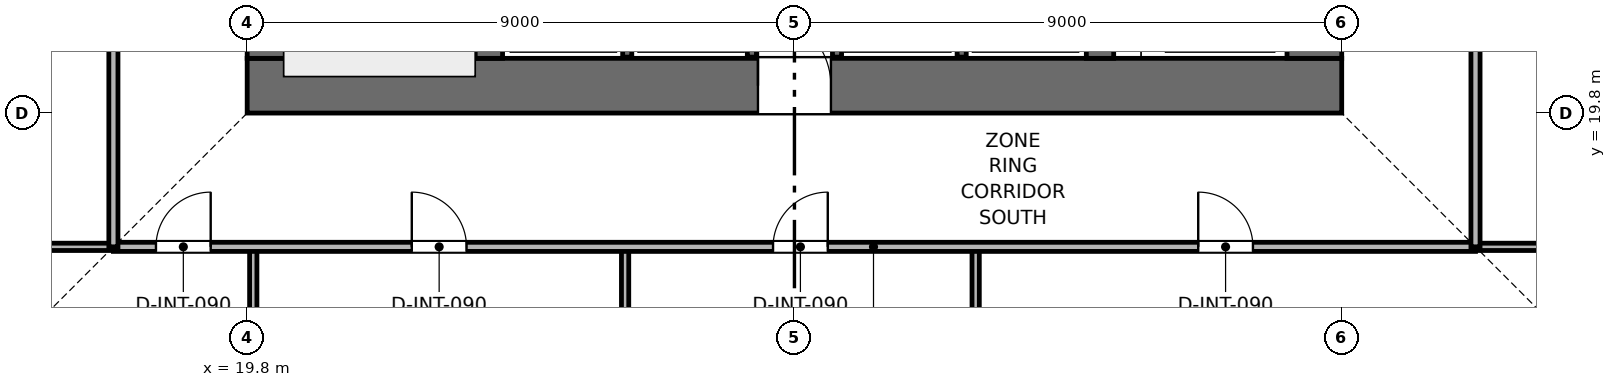
"""IFC4 building model, lengths in metres.
Left out: names, types, materials, properties, quantities, classifications, styles, units other than length and angle.
Written with IfcOpenShell. Run it as: python <this file> out.ifc"""

import sys

from ifc_helpers import new_model, si_unit, direction, frame, frame_2d, origin, place, context, subcontext, project, spatial, rectangle, extrude, element, fill, save


model = new_model("IFC4")
c1 = context("Model", 3, precision=1e-05, world=origin(), true_north=direction((0.0, 1.0)))
c2 = subcontext(c1, "Body", "Model", "MODEL_VIEW")
j1 = project(units=[si_unit("LENGTHUNIT", "METRE"), si_unit("PLANEANGLEUNIT", "RADIAN")], contexts=[c1])
p1 = place(None, origin())
s1 = spatial("IfcSite", under=j1, at=p1, CompositionType="ELEMENT")
p2 = place(p1, origin())
s2 = spatial("IfcBuilding", under=s1, at=p2, CompositionType="ELEMENT")
p3 = place(p2, frame((0.0, 0.0, 113.4)))
s3 = spatial("IfcBuildingStorey", under=s2, at=p3, CompositionType="ELEMENT", Elevation=113.4)
p4 = place(p3, frame((19.8, 20.25, 0.0), z_axis=(0.0, 0.0, 1.0), x_axis=(1.0, 0.0, 0.0)))
e1 = element("IfcWall", 1, at=p4, inside=s3, PredefinedType="SHEAR", context=c2, shape_type="SweptSolid", body=[
    extrude(rectangle(XDim=18.0, YDim=0.9, at=frame_2d((9.0, 0.0))), origin(), (0.0, 0.0, 1.0), 3.9),
])
p5 = place(p4, frame((8.4, 0.0, 0.0)))
e2 = element("IfcOpeningElement", 2, at=p5, cuts=e1, PredefinedType="OPENING", context=c2, shape_type="SweptSolid", body=[
    extrude(rectangle(XDim=1.2, YDim=2.2, at=frame_2d((0.6, 1.1))), frame((0.0, 0.46, 0.0), z_axis=(0.0, -1.0, 0.0), x_axis=(1.0, 0.0, 0.0)), (0.0, 0.0, 1.0), 0.92),
])
p6 = place(p3, frame((20.25, 20.7, 0.0), z_axis=(0.0, 0.0, 1.0), x_axis=(0.0, 1.0, 0.0)))
e3 = element("IfcWall", 3, at=p6, inside=s3, PredefinedType="SHEAR", context=c2, shape_type="SweptSolid", body=[
    extrude(rectangle(XDim=16.2, YDim=0.9, at=frame_2d((8.1, 0.0))), origin(), (0.0, 0.0, 1.0), 3.9),
])
p7 = place(p6, frame((10.1, 0.0, 0.0)))
e4 = element("IfcOpeningElement", 4, at=p7, cuts=e3, PredefinedType="OPENING", context=c2, shape_type="SweptSolid", body=[
    extrude(rectangle(XDim=1.1, YDim=2.15, at=frame_2d((0.55, 1.075))), frame((0.0, 0.46, 0.0), z_axis=(0.0, -1.0, 0.0), x_axis=(1.0, 0.0, 0.0)), (0.0, 0.0, 1.0), 0.92),
])
p8 = place(p3, frame((37.35, 20.7, 0.0), z_axis=(0.0, 0.0, 1.0), x_axis=(0.0, 1.0, 0.0)))
e5 = element("IfcWall", 5, at=p8, inside=s3, PredefinedType="SHEAR", context=c2, shape_type="SweptSolid", body=[
    extrude(rectangle(XDim=16.2, YDim=0.9, at=frame_2d((8.1, 0.0))), origin(), (0.0, 0.0, 1.0), 3.9),
])
p9 = place(p8, frame((4.6, 0.0, 0.0)))
e6 = element("IfcOpeningElement", 6, at=p9, cuts=e5, PredefinedType="OPENING", context=c2, shape_type="SweptSolid", body=[
    extrude(rectangle(XDim=1.1, YDim=2.15, at=frame_2d((0.55, 1.075))), frame((0.0, 0.46, 0.0), z_axis=(0.0, -1.0, 0.0), x_axis=(1.0, 0.0, 0.0)), (0.0, 0.0, 1.0), 0.92),
])
for number, where, z_axis, x_axis in (
    (7, (23.775, 20.7, 0.0), (0.0, 0.0, 1.0), (0.0, 1.0, 0.0)),
    (8, (33.825, 20.7, 0.0), (0.0, 0.0, 1.0), (0.0, 1.0, 0.0)),
):
    element("IfcWall", number, at=place(p3, frame(where, z_axis=z_axis, x_axis=x_axis)), inside=s3, PredefinedType="SHEAR", context=c2, shape_type="SweptSolid", body=[
        extrude(rectangle(XDim=16.2, YDim=0.45, at=frame_2d((8.1, 0.0))), origin(), (0.0, 0.0, 1.0), 3.9),
    ])
for number, where, z_axis, x_axis in (
    (9, (26.05, 20.72, 0.0), (0.0, 0.0, 1.0), (0.0, 1.0, 0.0)),
    (10, (28.1, 20.72, 0.0), (0.0, 0.0, 1.0), (0.0, 1.0, 0.0)),
    (11, (29.5, 20.72, 0.0), (0.0, 0.0, 1.0), (0.0, 1.0, 0.0)),
    (12, (31.55, 20.72, 0.0), (0.0, 0.0, 1.0), (0.0, 1.0, 0.0)),
):
    element("IfcWall", number, at=place(p3, frame(where, z_axis=z_axis, x_axis=x_axis)), inside=s3, PredefinedType="SHEAR", context=c2, shape_type="SweptSolid", body=[
        extrude(rectangle(XDim=2.26, YDim=0.15, at=frame_2d((1.13, 0.0))), origin(), (0.0, 0.0, 1.0), 3.65),
    ])
for number, where, z_axis, x_axis in (
    (13, (19.9, 2.83, 0.0), (0.0, 0.0, 1.0), (0.0, 1.0, 0.0)),
    (14, (26.015, 2.83, 0.0), (0.0, 0.0, 1.0), (0.0, 1.0, 0.0)),
    (15, (31.78, 2.83, 0.0), (0.0, 0.0, 1.0), (0.0, 1.0, 0.0)),
    (16, (2.83, 17.6, 0.0), (0.0, 0.0, 1.0), (1.0, 0.0, 0.0)),
    (17, (40.0, 17.6, 0.0), (0.0, 0.0, 1.0), (1.0, 0.0, 0.0)),
):
    element("IfcWall", number, at=place(p3, frame(where, z_axis=z_axis, x_axis=x_axis)), inside=s3, PredefinedType="PARTITIONING", context=c2, shape_type="SweptSolid", body=[
        extrude(rectangle(XDim=14.77, YDim=0.12, at=frame_2d((7.385, 0.0))), origin(), (0.0, 0.0, 1.0), 3.035),
    ])
p10 = place(p3, frame((17.6, 17.6, 0.0), z_axis=(0.0, 0.0, 1.0), x_axis=(1.0, 0.0, 0.0)))
e18 = element("IfcWall", 18, at=p10, inside=s3, PredefinedType="PARTITIONING", context=c2, shape_type="SweptSolid", body=[
    extrude(rectangle(XDim=22.4, YDim=0.15, at=frame_2d((11.2, 0.0))), origin(), (0.0, 0.0, 1.0), 3.185),
])
p11 = place(p10, frame((0.7, 0.0, 0.0)))
e19 = element("IfcOpeningElement", 19, at=p11, cuts=e18, PredefinedType="OPENING", context=c2, shape_type="SweptSolid", body=[
    extrude(rectangle(XDim=0.9, YDim=2.1, at=frame_2d((0.45, 1.05))), frame((0.0, 0.085, 0.0), z_axis=(0.0, -1.0, 0.0), x_axis=(1.0, 0.0, 0.0)), (0.0, 0.0, 1.0), 0.17),
])
p12 = place(p10, frame((4.907, 0.0, 0.0)))
e20 = element("IfcOpeningElement", 20, at=p12, cuts=e18, PredefinedType="OPENING", context=c2, shape_type="SweptSolid", body=[
    extrude(rectangle(XDim=0.9, YDim=2.1, at=frame_2d((0.45, 1.05))), frame((0.0, 0.085, 0.0), z_axis=(0.0, -1.0, 0.0), x_axis=(1.0, 0.0, 0.0)), (0.0, 0.0, 1.0), 0.17),
])
p13 = place(p10, frame((10.848, 0.0, 0.0)))
e21 = element("IfcOpeningElement", 21, at=p13, cuts=e18, PredefinedType="OPENING", context=c2, shape_type="SweptSolid", body=[
    extrude(rectangle(XDim=0.9, YDim=2.1, at=frame_2d((0.45, 1.05))), frame((0.0, 0.085, 0.0), z_axis=(0.0, -1.0, 0.0), x_axis=(1.0, 0.0, 0.0)), (0.0, 0.0, 1.0), 0.17),
])
p14 = place(p10, frame((17.84, 0.0, 0.0)))
e22 = element("IfcOpeningElement", 22, at=p14, cuts=e18, PredefinedType="OPENING", context=c2, shape_type="SweptSolid", body=[
    extrude(rectangle(XDim=0.9, YDim=2.1, at=frame_2d((0.45, 1.05))), frame((0.0, 0.085, 0.0), z_axis=(0.0, -1.0, 0.0), x_axis=(1.0, 0.0, 0.0)), (0.0, 0.0, 1.0), 0.17),
])
p15 = place(p3, frame((17.6, 17.6, 0.0), z_axis=(0.0, 0.0, 1.0), x_axis=(0.0, 1.0, 0.0)))
e23 = element("IfcWall", 23, at=p15, inside=s3, PredefinedType="PARTITIONING", context=c2, shape_type="SweptSolid", body=[
    extrude(rectangle(XDim=22.4, YDim=0.15, at=frame_2d((11.2, 0.0))), origin(), (0.0, 0.0, 1.0), 3.185),
])
p16 = place(p15, frame((4.616, 0.0, 0.0)))
e24 = element("IfcOpeningElement", 24, at=p16, cuts=e23, PredefinedType="OPENING", context=c2, shape_type="SweptSolid", body=[
    extrude(rectangle(XDim=0.9, YDim=2.1, at=frame_2d((0.45, 1.05))), frame((0.0, 0.085, 0.0), z_axis=(0.0, -1.0, 0.0), x_axis=(1.0, 0.0, 0.0)), (0.0, 0.0, 1.0), 0.17),
])
p17 = place(p15, frame((15.816, 0.0, 0.0)))
e25 = element("IfcOpeningElement", 25, at=p17, cuts=e23, PredefinedType="OPENING", context=c2, shape_type="SweptSolid", body=[
    extrude(rectangle(XDim=0.9, YDim=2.1, at=frame_2d((0.45, 1.05))), frame((0.0, 0.085, 0.0), z_axis=(0.0, -1.0, 0.0), x_axis=(1.0, 0.0, 0.0)), (0.0, 0.0, 1.0), 0.17),
])
p18 = place(p3, frame((40.0, 17.6, 0.0), z_axis=(0.0, 0.0, 1.0), x_axis=(0.0, 1.0, 0.0)))
e26 = element("IfcWall", 26, at=p18, inside=s3, PredefinedType="PARTITIONING", context=c2, shape_type="SweptSolid", body=[
    extrude(rectangle(XDim=22.4, YDim=0.15, at=frame_2d((11.2, 0.0))), origin(), (0.0, 0.0, 1.0), 3.185),
])
p19 = place(p18, frame((10.75, 0.0, 0.0)))
e27 = element("IfcOpeningElement", 27, at=p19, cuts=e26, PredefinedType="OPENING", context=c2, shape_type="SweptSolid", body=[
    extrude(rectangle(XDim=0.9, YDim=2.1, at=frame_2d((0.45, 1.05))), frame((0.0, 0.085, 0.0), z_axis=(0.0, -1.0, 0.0), x_axis=(1.0, 0.0, 0.0)), (0.0, 0.0, 1.0), 0.17),
])
p20 = place(p11, origin())
e28 = element("IfcDoor", 28, at=p20, inside=s3, OperationType="SINGLE_SWING_RIGHT", PredefinedType="DOOR", context=c2, shape_type="SweptSolid", body=[
    extrude(rectangle(XDim=0.9, YDim=2.1, at=frame_2d((0.45, 1.05))), frame((0.0, 0.025, 0.0), z_axis=(0.0, -1.0, 0.0), x_axis=(1.0, 0.0, 0.0)), (0.0, 0.0, 1.0), 0.05),
])
fill(e19, e28)
p21 = place(p12, origin())
e29 = element("IfcDoor", 29, at=p21, inside=s3, OperationType="SINGLE_SWING_LEFT", PredefinedType="DOOR", context=c2, shape_type="SweptSolid", body=[
    extrude(rectangle(XDim=0.9, YDim=2.1, at=frame_2d((0.45, 1.05))), frame((0.0, 0.025, 0.0), z_axis=(0.0, -1.0, 0.0), x_axis=(1.0, 0.0, 0.0)), (0.0, 0.0, 1.0), 0.05),
])
fill(e20, e29)
p22 = place(p13, origin())
e30 = element("IfcDoor", 30, at=p22, inside=s3, OperationType="SINGLE_SWING_RIGHT", PredefinedType="DOOR", context=c2, shape_type="SweptSolid", body=[
    extrude(rectangle(XDim=0.9, YDim=2.1, at=frame_2d((0.45, 1.05))), frame((0.0, 0.025, 0.0), z_axis=(0.0, -1.0, 0.0), x_axis=(1.0, 0.0, 0.0)), (0.0, 0.0, 1.0), 0.05),
])
fill(e21, e30)
p23 = place(p14, origin())
e31 = element("IfcDoor", 31, at=p23, inside=s3, OperationType="SINGLE_SWING_LEFT", PredefinedType="DOOR", context=c2, shape_type="SweptSolid", body=[
    extrude(rectangle(XDim=0.9, YDim=2.1, at=frame_2d((0.45, 1.05))), frame((0.0, 0.025, 0.0), z_axis=(0.0, -1.0, 0.0), x_axis=(1.0, 0.0, 0.0)), (0.0, 0.0, 1.0), 0.05),
])
fill(e22, e31)
p24 = place(p5, origin())
e32 = element("IfcDoor", 32, at=p24, inside=s3, OperationType="SINGLE_SWING_LEFT", PredefinedType="DOOR", context=c2, shape_type="SweptSolid", body=[
    extrude(rectangle(XDim=1.2, YDim=2.2, at=frame_2d((0.6, 1.1))), frame((0.0, 0.025, 0.0), z_axis=(0.0, -1.0, 0.0), x_axis=(1.0, 0.0, 0.0)), (0.0, 0.0, 1.0), 0.05),
])
fill(e2, e32)
save(model, sys.argv[1])
